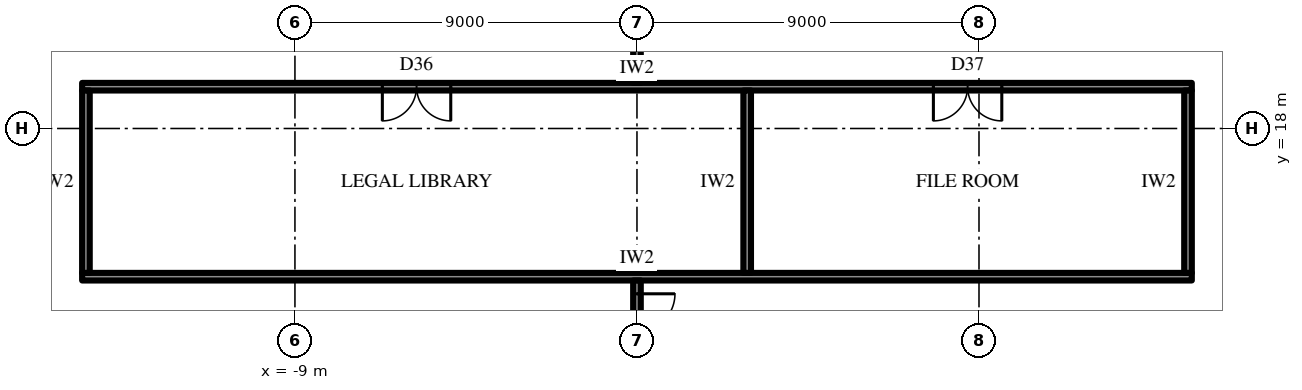
"""IFC4 building model, lengths in metres.
Left out: names, types, materials, properties, quantities, classifications, styles, units other than length and angle.
Written with IfcOpenShell. Run it as: python <this file> out.ifc"""

import sys

from ifc_helpers import new_model, si_unit, direction, frame, frame_2d, origin, place, context, subcontext, project, spatial, rectangle, extrude, element, fill, save


model = new_model("IFC4")
c1 = context("Model", 3, precision=1e-05, world=origin(), true_north=direction((0.0, 1.0)))
c2 = subcontext(c1, "Body", "Model", "MODEL_VIEW")
j1 = project(units=[si_unit("LENGTHUNIT", "METRE"), si_unit("PLANEANGLEUNIT", "RADIAN")], contexts=[c1])
p1 = place(None, origin())
s1 = spatial("IfcSite", under=j1, at=p1, CompositionType="ELEMENT")
p2 = place(p1, origin())
s2 = spatial("IfcBuilding", under=s1, at=p2, CompositionType="ELEMENT")
p3 = place(p2, frame((0.0, 0.0, 228.1)))
s3 = spatial("IfcBuildingStorey", under=s2, at=p3, CompositionType="ELEMENT", Elevation=228.1)
p4 = place(p3, frame((-14.6, 14.1, 0.0), z_axis=(0.0, 0.0, 1.0), x_axis=(1.0, 0.0, 0.0)))
e1 = element("IfcWall", 1, at=p4, inside=s3, PredefinedType="PARTITIONING", context=c2, shape_type="SweptSolid", body=[
    extrude(rectangle(XDim=29.2, YDim=0.2, at=frame_2d((14.6, 0.0))), origin(), (0.0, 0.0, 1.0), 4.0),
])
p5 = place(p3, frame((-14.6, 19.1, 0.0), z_axis=(0.0, 0.0, 1.0), x_axis=(1.0, 0.0, 0.0)))
e2 = element("IfcWall", 2, at=p5, inside=s3, PredefinedType="PARTITIONING", context=c2, shape_type="SweptSolid", body=[
    extrude(rectangle(XDim=29.2, YDim=0.2, at=frame_2d((14.6, 0.0))), origin(), (0.0, 0.0, 1.0), 4.0),
])
p6 = place(p5, frame((7.9, 0.0, 0.0)))
e3 = element("IfcOpeningElement", 3, at=p6, cuts=e2, PredefinedType="OPENING", context=c2, shape_type="SweptSolid", body=[
    extrude(rectangle(XDim=1.8, YDim=2.4, at=frame_2d((0.9, 1.2))), frame((0.0, 0.11, 0.0), z_axis=(0.0, -1.0, 0.0), x_axis=(1.0, 0.0, 0.0)), (0.0, 0.0, 1.0), 0.22),
])
p7 = place(p5, frame((22.4, 0.0, 0.0)))
e4 = element("IfcOpeningElement", 4, at=p7, cuts=e2, PredefinedType="OPENING", context=c2, shape_type="SweptSolid", body=[
    extrude(rectangle(XDim=1.8, YDim=2.4, at=frame_2d((0.9, 1.2))), frame((0.0, 0.11, 0.0), z_axis=(0.0, -1.0, 0.0), x_axis=(1.0, 0.0, 0.0)), (0.0, 0.0, 1.0), 0.22),
])
for number, where, z_axis, x_axis in (
    (5, (-14.5, 14.2, 0.0), (0.0, 0.0, 1.0), (0.0, 1.0, 0.0)),
    (6, (2.9, 14.2, 0.0), (0.0, 0.0, 1.0), (0.0, 1.0, 0.0)),
    (7, (14.5, 14.2, 0.0), (0.0, 0.0, 1.0), (0.0, 1.0, 0.0)),
):
    element("IfcWall", number, at=place(p3, frame(where, z_axis=z_axis, x_axis=x_axis)), inside=s3, PredefinedType="PARTITIONING", context=c2, shape_type="SweptSolid", body=[
        extrude(rectangle(XDim=4.8, YDim=0.2, at=frame_2d((2.4, 0.0))), origin(), (0.0, 0.0, 1.0), 4.0),
    ])
p8 = place(p3, frame((0.0, 12.3, 0.0), z_axis=(0.0, 0.0, 1.0), x_axis=(0.0, 1.0, 0.0)))
e8 = element("IfcWall", 8, at=p8, inside=s3, PredefinedType="PARTITIONING", context=c2, shape_type="SweptSolid", body=[
    extrude(rectangle(XDim=1.7, YDim=0.2, at=frame_2d((0.85, 0.0))), origin(), (0.0, 0.0, 1.0), 2.992),
])
p9 = place(p8, frame((0.35, 0.0, 0.0)))
e9 = element("IfcOpeningElement", 9, at=p9, cuts=e8, PredefinedType="OPENING", context=c2, shape_type="SweptSolid", body=[
    extrude(rectangle(XDim=1.0, YDim=2.2, at=frame_2d((0.5, 1.1))), frame((0.0, 0.11, 0.0), z_axis=(0.0, -1.0, 0.0), x_axis=(1.0, 0.0, 0.0)), (0.0, 0.0, 1.0), 0.22),
])
p10 = place(p3, frame((0.0, 19.2, 0.0), z_axis=(0.0, 0.0, 1.0), x_axis=(0.0, 1.0, 0.0)))
e10 = element("IfcWall", 10, at=p10, inside=s3, PredefinedType="PARTITIONING", context=c2, shape_type="SweptSolid", body=[
    extrude(rectangle(XDim=5.2, YDim=0.2, at=frame_2d((2.6, 0.0))), origin(), (0.0, 0.0, 1.0), 2.992),
])
p11 = place(p6, frame((1.8, 0.0, 0.0), z_axis=(0.0, 0.0, 1.0), x_axis=(-1.0, 0.0, 0.0)))
e11 = element("IfcDoor", 11, at=p11, inside=s3, OperationType="DOUBLE_DOOR_SINGLE_SWING", PredefinedType="DOOR", context=c2, shape_type="SweptSolid", body=[
    extrude(rectangle(XDim=1.8, YDim=2.4, at=frame_2d((0.9, 1.2))), frame((0.0, 0.025, 0.0), z_axis=(0.0, -1.0, 0.0), x_axis=(1.0, 0.0, 0.0)), (0.0, 0.0, 1.0), 0.05),
])
fill(e3, e11)
p12 = place(p7, frame((1.8, 0.0, 0.0), z_axis=(0.0, 0.0, 1.0), x_axis=(-1.0, 0.0, 0.0)))
e12 = element("IfcDoor", 12, at=p12, inside=s3, OperationType="DOUBLE_DOOR_SINGLE_SWING", PredefinedType="DOOR", context=c2, shape_type="SweptSolid", body=[
    extrude(rectangle(XDim=1.8, YDim=2.4, at=frame_2d((0.9, 1.2))), frame((0.0, 0.025, 0.0), z_axis=(0.0, -1.0, 0.0), x_axis=(1.0, 0.0, 0.0)), (0.0, 0.0, 1.0), 0.05),
])
fill(e4, e12)
p13 = place(p9, frame((1.0, 0.0, 0.0), z_axis=(0.0, 0.0, 1.0), x_axis=(-1.0, 0.0, 0.0)))
e13 = element("IfcDoor", 13, at=p13, inside=s3, OperationType="SINGLE_SWING_RIGHT", PredefinedType="DOOR", context=c2, shape_type="SweptSolid", body=[
    extrude(rectangle(XDim=1.0, YDim=2.2, at=frame_2d((0.5, 1.1))), frame((0.0, 0.025, 0.0), z_axis=(0.0, -1.0, 0.0), x_axis=(1.0, 0.0, 0.0)), (0.0, 0.0, 1.0), 0.05),
])
fill(e9, e13)
save(model, sys.argv[1])
